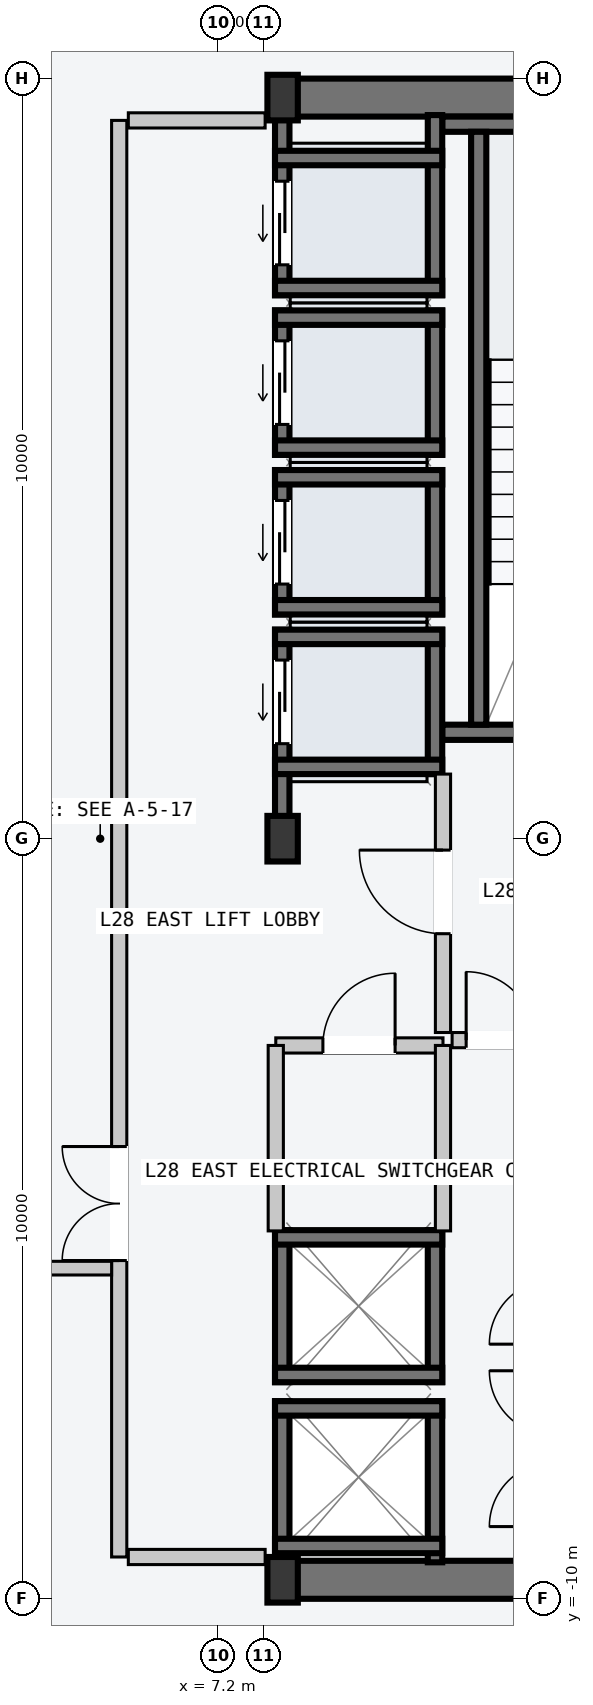
"""IFC4 building model, lengths in metres.
Left out: names, types, materials, properties, quantities, classifications, styles, units other than length and angle.
Written with IfcOpenShell. Run it as: python <this file> out.ifc"""

import sys

from ifc_helpers import new_model, si_unit, direction, frame, frame_2d, origin, origin_2d, place, context, subcontext, project, spatial, rectangle, i_section, extrude, element, fill, save


model = new_model("IFC4")
c1 = context("Model", 3, precision=1e-05, world=origin(), true_north=direction((0.0, 1.0)))
c2 = subcontext(c1, "Body", "Model", "MODEL_VIEW")
j1 = project(units=[si_unit("LENGTHUNIT", "METRE"), si_unit("PLANEANGLEUNIT", "RADIAN")], contexts=[c1])
p1 = place(None, origin())
s1 = spatial("IfcSite", under=j1, at=p1, CompositionType="ELEMENT")
p2 = place(p1, origin())
s2 = spatial("IfcBuilding", under=s1, at=p2, CompositionType="ELEMENT")
p3 = place(p2, frame((0.0, 0.0, 109.8)))
s3 = spatial("IfcBuildingStorey", under=s2, at=p3, CompositionType="ELEMENT", Elevation=109.8)
for number, where, z_axis, x_axis in (
    (1, (8.07, -9.75, -0.2), (0.0, 0.0, 1.0), (1.0, 0.0, 0.0)),
    (2, (8.07, 9.75, -0.2), (0.0, 0.0, 1.0), (1.0, 0.0, 0.0)),
):
    element("IfcWall", number, at=place(p3, frame(where, z_axis=z_axis, x_axis=x_axis)), inside=s3, PredefinedType="SHEAR", context=c2, shape_type="SweptSolid", body=[
        extrude(rectangle(XDim=6.46, YDim=0.5, at=frame_2d((3.23, 0.0))), origin(), (0.0, 0.0, 1.0), 3.6),
    ])
p4 = place(p3, frame((10.15, 1.4, -0.2), z_axis=(0.0, 0.0, 1.0), x_axis=(1.0, 0.0, 0.0)))
e3 = element("IfcWall", 3, at=p4, inside=s3, PredefinedType="SOLIDWALL", context=c2, shape_type="SweptSolid", body=[
    extrude(rectangle(XDim=4.1, YDim=0.2, at=frame_2d((2.05, 0.0))), origin(), (0.0, 0.0, 1.0), 3.6),
])
p5 = place(p4, frame((1.5, 0.0, 0.2)))
e4 = element("IfcOpeningElement", 4, at=p5, cuts=e3, PredefinedType="OPENING", context=c2, shape_type="SweptSolid", body=[
    extrude(rectangle(XDim=1.12, YDim=2.18, at=frame_2d((0.56, 1.09))), frame((0.0, 0.11, 0.0), z_axis=(0.0, -1.0, 0.0), x_axis=(1.0, 0.0, 0.0)), (0.0, 0.0, 1.0), 0.22),
])
p6 = place(p3, frame((10.15, 9.4, -0.2), z_axis=(0.0, 0.0, 1.0), x_axis=(1.0, 0.0, 0.0)))
e5 = element("IfcWall", 5, at=p6, inside=s3, PredefinedType="SOLIDWALL", context=c2, shape_type="SweptSolid", body=[
    extrude(rectangle(XDim=4.1, YDim=0.2, at=frame_2d((2.05, 0.0))), origin(), (0.0, 0.0, 1.0), 3.6),
])
p7 = place(p3, frame((10.63, 1.5, -0.2), z_axis=(0.0, 0.0, 1.0), x_axis=(0.0, 1.0, 0.0)))
e6 = element("IfcWall", 6, at=p7, inside=s3, PredefinedType="SOLIDWALL", context=c2, shape_type="SweptSolid", body=[
    extrude(rectangle(XDim=7.8, YDim=0.2, at=frame_2d((3.9, 0.0))), origin(), (0.0, 0.0, 1.0), 3.6),
])
for number, where, z_axis, x_axis in (
    (7, (8.05, -9.75, 0.0), (0.0, 0.0, 1.0), (1.0, 0.0, 0.0)),
    (8, (8.05, 0.0, 0.0), (0.0, 0.0, 1.0), (1.0, 0.0, 0.0)),
    (9, (8.05, 9.75, 0.0), (0.0, 0.0, 1.0), (1.0, 0.0, 0.0)),
):
    element("IfcColumn", number, at=place(p3, frame(where, z_axis=z_axis, x_axis=x_axis)), inside=s3, PredefinedType="COLUMN", context=c2, shape_type="SweptSolid", body=[
        extrude(i_section(OverallWidth=0.4, OverallDepth=0.6, WebThickness=0.022, FlangeThickness=0.036, at=origin_2d()), origin(), (0.0, 0.0, 1.0), 3.6),
    ])
p8 = place(p3, frame((8.045, 0.21, -0.2), z_axis=(0.0, 0.0, 1.0), x_axis=(0.0, 1.0, 0.0)))
e10 = element("IfcWall", 10, at=p8, inside=s3, PredefinedType="SOLIDWALL", context=c2, shape_type="SweptSolid", body=[
    extrude(rectangle(XDim=2.54, YDim=0.19, at=frame_2d((1.27, 0.0))), origin(), (0.0, 0.0, 1.0), 3.6),
])
p9 = place(p8, frame((1.04, 0.0, 0.2)))
e11 = element("IfcOpeningElement", 11, at=p9, cuts=e10, PredefinedType="OPENING", context=c2, shape_type="SweptSolid", body=[
    extrude(rectangle(XDim=1.1, YDim=2.2, at=frame_2d((0.55, 1.1))), frame((0.0, 0.105, 0.0), z_axis=(0.0, -1.0, 0.0), x_axis=(1.0, 0.0, 0.0)), (0.0, 0.0, 1.0), 0.21),
])
p10 = place(p3, frame((10.055, 0.85, -0.2), z_axis=(0.0, 0.0, 1.0), x_axis=(0.0, 1.0, 0.0)))
e12 = element("IfcWall", 12, at=p10, inside=s3, PredefinedType="SOLIDWALL", context=c2, shape_type="SweptSolid", body=[
    extrude(rectangle(XDim=1.9, YDim=0.19, at=frame_2d((0.95, 0.0))), origin(), (0.0, 0.0, 1.0), 3.6),
])
for number, where, z_axis, x_axis in (
    (13, (7.95, 2.655, -0.2), (0.0, 0.0, 1.0), (1.0, 0.0, 0.0)),
    (14, (7.95, 0.945, -0.2), (0.0, 0.0, 1.0), (1.0, 0.0, 0.0)),
):
    element("IfcWall", number, at=place(p3, frame(where, z_axis=z_axis, x_axis=x_axis)), inside=s3, PredefinedType="SOLIDWALL", context=c2, shape_type="SweptSolid", body=[
        extrude(rectangle(XDim=2.2, YDim=0.19, at=frame_2d((1.1, 0.0))), origin(), (0.0, 0.0, 1.0), 3.6),
    ])
p11 = place(p3, frame((8.045, 2.95, -0.2), z_axis=(0.0, 0.0, 1.0), x_axis=(0.0, 1.0, 0.0)))
e15 = element("IfcWall", 15, at=p11, inside=s3, PredefinedType="SOLIDWALL", context=c2, shape_type="SweptSolid", body=[
    extrude(rectangle(XDim=1.9, YDim=0.19, at=frame_2d((0.95, 0.0))), origin(), (0.0, 0.0, 1.0), 3.6),
])
p12 = place(p11, frame((0.4, 0.0, 0.2)))
e16 = element("IfcOpeningElement", 16, at=p12, cuts=e15, PredefinedType="OPENING", context=c2, shape_type="SweptSolid", body=[
    extrude(rectangle(XDim=1.1, YDim=2.2, at=frame_2d((0.55, 1.1))), frame((0.0, 0.105, 0.0), z_axis=(0.0, -1.0, 0.0), x_axis=(1.0, 0.0, 0.0)), (0.0, 0.0, 1.0), 0.21),
])
p13 = place(p3, frame((10.055, 2.95, -0.2), z_axis=(0.0, 0.0, 1.0), x_axis=(0.0, 1.0, 0.0)))
e17 = element("IfcWall", 17, at=p13, inside=s3, PredefinedType="SOLIDWALL", context=c2, shape_type="SweptSolid", body=[
    extrude(rectangle(XDim=1.9, YDim=0.19, at=frame_2d((0.95, 0.0))), origin(), (0.0, 0.0, 1.0), 3.6),
])
for number, where, z_axis, x_axis in (
    (18, (7.95, 4.755, -0.2), (0.0, 0.0, 1.0), (1.0, 0.0, 0.0)),
    (19, (7.95, 3.045, -0.2), (0.0, 0.0, 1.0), (1.0, 0.0, 0.0)),
):
    element("IfcWall", number, at=place(p3, frame(where, z_axis=z_axis, x_axis=x_axis)), inside=s3, PredefinedType="SOLIDWALL", context=c2, shape_type="SweptSolid", body=[
        extrude(rectangle(XDim=2.2, YDim=0.19, at=frame_2d((1.1, 0.0))), origin(), (0.0, 0.0, 1.0), 3.6),
    ])
p14 = place(p3, frame((8.045, 5.05, -0.2), z_axis=(0.0, 0.0, 1.0), x_axis=(0.0, 1.0, 0.0)))
e20 = element("IfcWall", 20, at=p14, inside=s3, PredefinedType="SOLIDWALL", context=c2, shape_type="SweptSolid", body=[
    extrude(rectangle(XDim=1.9, YDim=0.19, at=frame_2d((0.95, 0.0))), origin(), (0.0, 0.0, 1.0), 3.6),
])
p15 = place(p14, frame((0.4, 0.0, 0.2)))
e21 = element("IfcOpeningElement", 21, at=p15, cuts=e20, PredefinedType="OPENING", context=c2, shape_type="SweptSolid", body=[
    extrude(rectangle(XDim=1.1, YDim=2.2, at=frame_2d((0.55, 1.1))), frame((0.0, 0.105, 0.0), z_axis=(0.0, -1.0, 0.0), x_axis=(1.0, 0.0, 0.0)), (0.0, 0.0, 1.0), 0.21),
])
p16 = place(p3, frame((10.055, 5.05, -0.2), z_axis=(0.0, 0.0, 1.0), x_axis=(0.0, 1.0, 0.0)))
e22 = element("IfcWall", 22, at=p16, inside=s3, PredefinedType="SOLIDWALL", context=c2, shape_type="SweptSolid", body=[
    extrude(rectangle(XDim=1.9, YDim=0.19, at=frame_2d((0.95, 0.0))), origin(), (0.0, 0.0, 1.0), 3.6),
])
for number, where, z_axis, x_axis in (
    (23, (7.95, 6.855, -0.2), (0.0, 0.0, 1.0), (1.0, 0.0, 0.0)),
    (24, (7.95, 5.145, -0.2), (0.0, 0.0, 1.0), (1.0, 0.0, 0.0)),
):
    element("IfcWall", number, at=place(p3, frame(where, z_axis=z_axis, x_axis=x_axis)), inside=s3, PredefinedType="SOLIDWALL", context=c2, shape_type="SweptSolid", body=[
        extrude(rectangle(XDim=2.2, YDim=0.19, at=frame_2d((1.1, 0.0))), origin(), (0.0, 0.0, 1.0), 3.6),
    ])
p17 = place(p3, frame((8.045, 7.15, -0.2), z_axis=(0.0, 0.0, 1.0), x_axis=(0.0, 1.0, 0.0)))
e25 = element("IfcWall", 25, at=p17, inside=s3, PredefinedType="SOLIDWALL", context=c2, shape_type="SweptSolid", body=[
    extrude(rectangle(XDim=2.37, YDim=0.19, at=frame_2d((1.185, 0.0))), origin(), (0.0, 0.0, 1.0), 3.6),
])
p18 = place(p17, frame((0.4, 0.0, 0.2)))
e26 = element("IfcOpeningElement", 26, at=p18, cuts=e25, PredefinedType="OPENING", context=c2, shape_type="SweptSolid", body=[
    extrude(rectangle(XDim=1.1, YDim=2.2, at=frame_2d((0.55, 1.1))), frame((0.0, 0.105, 0.0), z_axis=(0.0, -1.0, 0.0), x_axis=(1.0, 0.0, 0.0)), (0.0, 0.0, 1.0), 0.21),
])
p19 = place(p3, frame((10.055, 7.15, -0.2), z_axis=(0.0, 0.0, 1.0), x_axis=(0.0, 1.0, 0.0)))
e27 = element("IfcWall", 27, at=p19, inside=s3, PredefinedType="SOLIDWALL", context=c2, shape_type="SweptSolid", body=[
    extrude(rectangle(XDim=2.37, YDim=0.19, at=frame_2d((1.185, 0.0))), origin(), (0.0, 0.0, 1.0), 3.6),
])
for number, where, z_axis, x_axis in (
    (28, (7.95, 8.955, -0.2), (0.0, 0.0, 1.0), (1.0, 0.0, 0.0)),
    (29, (7.95, 7.245, -0.2), (0.0, 0.0, 1.0), (1.0, 0.0, 0.0)),
):
    element("IfcWall", number, at=place(p3, frame(where, z_axis=z_axis, x_axis=x_axis)), inside=s3, PredefinedType="SOLIDWALL", context=c2, shape_type="SweptSolid", body=[
        extrude(rectangle(XDim=2.2, YDim=0.19, at=frame_2d((1.1, 0.0))), origin(), (0.0, 0.0, 1.0), 3.6),
    ])
for number, where, z_axis, x_axis in (
    (30, (8.045, -9.52, -0.2), (0.0, 0.0, 1.0), (0.0, 1.0, 0.0)),
    (31, (10.055, -9.52, -0.2), (0.0, 0.0, 1.0), (0.0, 1.0, 0.0)),
):
    element("IfcWall", number, at=place(p3, frame(where, z_axis=z_axis, x_axis=x_axis)), inside=s3, PredefinedType="SOLIDWALL", context=c2, shape_type="SweptSolid", body=[
        extrude(rectangle(XDim=2.12, YDim=0.19, at=frame_2d((1.06, 0.0))), origin(), (0.0, 0.0, 1.0), 3.6),
    ])
for number, where, z_axis, x_axis in (
    (32, (7.95, -7.495, -0.2), (0.0, 0.0, 1.0), (1.0, 0.0, 0.0)),
    (33, (7.95, -9.305, -0.2), (0.0, 0.0, 1.0), (1.0, 0.0, 0.0)),
):
    element("IfcWall", number, at=place(p3, frame(where, z_axis=z_axis, x_axis=x_axis)), inside=s3, PredefinedType="SOLIDWALL", context=c2, shape_type="SweptSolid", body=[
        extrude(rectangle(XDim=2.2, YDim=0.19, at=frame_2d((1.1, 0.0))), origin(), (0.0, 0.0, 1.0), 3.6),
    ])
for number, where, z_axis, x_axis in (
    (34, (8.045, -7.15, -0.2), (0.0, 0.0, 1.0), (0.0, 1.0, 0.0)),
    (35, (10.055, -7.15, -0.2), (0.0, 0.0, 1.0), (0.0, 1.0, 0.0)),
):
    element("IfcWall", number, at=place(p3, frame(where, z_axis=z_axis, x_axis=x_axis)), inside=s3, PredefinedType="SOLIDWALL", context=c2, shape_type="SweptSolid", body=[
        extrude(rectangle(XDim=2.0, YDim=0.19, at=frame_2d((1.0, 0.0))), origin(), (0.0, 0.0, 1.0), 3.6),
    ])
for number, where, z_axis, x_axis in (
    (36, (7.95, -5.245, -0.2), (0.0, 0.0, 1.0), (1.0, 0.0, 0.0)),
    (37, (7.95, -7.055, -0.2), (0.0, 0.0, 1.0), (1.0, 0.0, 0.0)),
):
    element("IfcWall", number, at=place(p3, frame(where, z_axis=z_axis, x_axis=x_axis)), inside=s3, PredefinedType="SOLIDWALL", context=c2, shape_type="SweptSolid", body=[
        extrude(rectangle(XDim=2.2, YDim=0.19, at=frame_2d((1.1, 0.0))), origin(), (0.0, 0.0, 1.0), 3.6),
    ])
p20 = place(p3, frame((5.9, -9.45, 0.0), z_axis=(0.0, 0.0, 1.0), x_axis=(0.0, 1.0, 0.0)))
e38 = element("IfcWall", 38, at=p20, inside=s3, PredefinedType="PARTITIONING", context=c2, shape_type="SweptSolid", body=[
    extrude(rectangle(XDim=18.9, YDim=0.2, at=frame_2d((9.45, 0.0))), origin(), (0.0, 0.0, 1.0), 3.4),
])
p21 = place(p20, frame((3.9, 0.0, 0.0)))
e39 = element("IfcOpeningElement", 39, at=p21, cuts=e38, PredefinedType="OPENING", context=c2, shape_type="SweptSolid", body=[
    extrude(rectangle(XDim=1.5, YDim=2.2, at=frame_2d((0.75, 1.1))), frame((0.0, 0.11, 0.0), z_axis=(0.0, -1.0, 0.0), x_axis=(1.0, 0.0, 0.0)), (0.0, 0.0, 1.0), 0.22),
])
for number, where, z_axis, x_axis in (
    (40, (6.02, -9.45, 0.0), (0.0, 0.0, 1.0), (1.0, 0.0, 0.0)),
    (41, (6.02, 9.45, 0.0), (0.0, 0.0, 1.0), (1.0, 0.0, 0.0)),
):
    element("IfcWall", number, at=place(p3, frame(where, z_axis=z_axis, x_axis=x_axis)), inside=s3, PredefinedType="PARTITIONING", context=c2, shape_type="SweptSolid", body=[
        extrude(rectangle(XDim=1.8, YDim=0.2, at=frame_2d((0.9, 0.0))), origin(), (0.0, 0.0, 1.0), 3.4),
    ])
p22 = place(p3, frame((10.16, -2.55, 0.0), z_axis=(0.0, 0.0, 1.0), x_axis=(0.0, 1.0, 0.0)))
e42 = element("IfcWall", 42, at=p22, inside=s3, PredefinedType="PARTITIONING", context=c2, shape_type="SweptSolid", body=[
    extrude(rectangle(XDim=3.4, YDim=0.2, at=frame_2d((1.7, 0.0))), origin(), (0.0, 0.0, 1.0), 3.4),
])
p23 = place(p22, frame((1.3, 0.0, 0.0)))
e43 = element("IfcOpeningElement", 43, at=p23, cuts=e42, PredefinedType="OPENING", context=c2, shape_type="SweptSolid", body=[
    extrude(rectangle(XDim=1.1, YDim=2.15, at=frame_2d((0.55, 1.075))), frame((0.0, 0.11, 0.0), z_axis=(0.0, -1.0, 0.0), x_axis=(1.0, 0.0, 0.0)), (0.0, 0.0, 1.0), 0.22),
])
p24 = place(p3, frame((10.28, -2.65, 0.0), z_axis=(0.0, 0.0, 1.0), x_axis=(1.0, 0.0, 0.0)))
e44 = element("IfcWall", 44, at=p24, inside=s3, PredefinedType="PARTITIONING", context=c2, shape_type="SweptSolid", body=[
    extrude(rectangle(XDim=1.27, YDim=0.2, at=frame_2d((0.635, 0.0))), origin(), (0.0, 0.0, 1.0), 3.4),
])
p25 = place(p24, frame((0.185, 0.0, 0.0)))
e45 = element("IfcOpeningElement", 45, at=p25, cuts=e44, PredefinedType="OPENING", context=c2, shape_type="SweptSolid", body=[
    extrude(rectangle(XDim=0.9, YDim=2.15, at=frame_2d((0.45, 1.075))), frame((0.0, 0.11, 0.0), z_axis=(0.0, -1.0, 0.0), x_axis=(1.0, 0.0, 0.0)), (0.0, 0.0, 1.0), 0.22),
])
p26 = place(p3, frame((7.96, -2.72, 0.0), z_axis=(0.0, 0.0, 1.0), x_axis=(1.0, 0.0, 0.0)))
e46 = element("IfcWall", 46, at=p26, inside=s3, PredefinedType="PARTITIONING", context=c2, shape_type="SweptSolid", body=[
    extrude(rectangle(XDim=2.2, YDim=0.2, at=frame_2d((1.1, 0.0))), origin(), (0.0, 0.0, 1.0), 3.4),
])
p27 = place(p26, frame((0.62, 0.0, 0.0)))
e47 = element("IfcOpeningElement", 47, at=p27, cuts=e46, PredefinedType="OPENING", context=c2, shape_type="SweptSolid", body=[
    extrude(rectangle(XDim=0.95, YDim=2.1, at=frame_2d((0.475, 1.05))), frame((0.0, 0.11, 0.0), z_axis=(0.0, -1.0, 0.0), x_axis=(1.0, 0.0, 0.0)), (0.0, 0.0, 1.0), 0.22),
])
for number, where, z_axis, x_axis in (
    (48, (7.96, -5.16, 0.0), (0.0, 0.0, 1.0), (0.0, 1.0, 0.0)),
    (49, (10.16, -5.16, 0.0), (0.0, 0.0, 1.0), (0.0, 1.0, 0.0)),
):
    element("IfcWall", number, at=place(p3, frame(where, z_axis=z_axis, x_axis=x_axis)), inside=s3, PredefinedType="PARTITIONING", context=c2, shape_type="SweptSolid", body=[
        extrude(rectangle(XDim=2.44, YDim=0.2, at=frame_2d((1.22, 0.0))), origin(), (0.0, 0.0, 1.0), 3.4),
    ])
p28 = place(p3, frame((-5.8, -5.65, 0.0), z_axis=(0.0, 0.0, 1.0), x_axis=(1.0, 0.0, 0.0)))
e50 = element("IfcWall", 50, at=p28, inside=s3, PredefinedType="PARTITIONING", context=c2, shape_type="SweptSolid", body=[
    extrude(rectangle(XDim=11.6, YDim=0.18, at=frame_2d((5.8, 0.0))), origin(), (0.0, 0.0, 1.0), 3.4),
])
p29 = place(p28, frame((5.1, 0.0, 0.0)))
e51 = element("IfcOpeningElement", 51, at=p29, cuts=e50, PredefinedType="OPENING", context=c2, shape_type="SweptSolid", body=[
    extrude(rectangle(XDim=1.4, YDim=2.2, at=frame_2d((0.7, 1.1))), frame((0.0, 0.1, 0.0), z_axis=(0.0, -1.0, 0.0), x_axis=(1.0, 0.0, 0.0)), (0.0, 0.0, 1.0), 0.2),
])
p30 = place(p9, origin())
e52 = element("IfcDoor", 52, at=p30, inside=s3, OperationType="SLIDING_TO_LEFT", PredefinedType="DOOR", context=c2, shape_type="SweptSolid", body=[
    extrude(rectangle(XDim=1.1, YDim=2.2, at=frame_2d((0.55, 1.1))), frame((0.0, 0.025, 0.0), z_axis=(0.0, -1.0, 0.0), x_axis=(1.0, 0.0, 0.0)), (0.0, 0.0, 1.0), 0.05),
])
fill(e11, e52)
p31 = place(p12, origin())
e53 = element("IfcDoor", 53, at=p31, inside=s3, OperationType="SLIDING_TO_LEFT", PredefinedType="DOOR", context=c2, shape_type="SweptSolid", body=[
    extrude(rectangle(XDim=1.1, YDim=2.2, at=frame_2d((0.55, 1.1))), frame((0.0, 0.025, 0.0), z_axis=(0.0, -1.0, 0.0), x_axis=(1.0, 0.0, 0.0)), (0.0, 0.0, 1.0), 0.05),
])
fill(e16, e53)
p32 = place(p15, origin())
e54 = element("IfcDoor", 54, at=p32, inside=s3, OperationType="SLIDING_TO_LEFT", PredefinedType="DOOR", context=c2, shape_type="SweptSolid", body=[
    extrude(rectangle(XDim=1.1, YDim=2.2, at=frame_2d((0.55, 1.1))), frame((0.0, 0.025, 0.0), z_axis=(0.0, -1.0, 0.0), x_axis=(1.0, 0.0, 0.0)), (0.0, 0.0, 1.0), 0.05),
])
fill(e21, e54)
p33 = place(p18, origin())
e55 = element("IfcDoor", 55, at=p33, inside=s3, OperationType="SLIDING_TO_LEFT", PredefinedType="DOOR", context=c2, shape_type="SweptSolid", body=[
    extrude(rectangle(XDim=1.1, YDim=2.2, at=frame_2d((0.55, 1.1))), frame((0.0, 0.025, 0.0), z_axis=(0.0, -1.0, 0.0), x_axis=(1.0, 0.0, 0.0)), (0.0, 0.0, 1.0), 0.05),
])
fill(e26, e55)
p34 = place(p21, origin())
e56 = element("IfcDoor", 56, at=p34, inside=s3, OperationType="DOUBLE_DOOR_SINGLE_SWING", PredefinedType="DOOR", context=c2, shape_type="SweptSolid", body=[
    extrude(rectangle(XDim=1.5, YDim=2.2, at=frame_2d((0.75, 1.1))), frame((0.0, 0.025, 0.0), z_axis=(0.0, -1.0, 0.0), x_axis=(1.0, 0.0, 0.0)), (0.0, 0.0, 1.0), 0.05),
])
fill(e39, e56)
p35 = place(p23, origin())
e57 = element("IfcDoor", 57, at=p35, inside=s3, OperationType="SINGLE_SWING_RIGHT", PredefinedType="DOOR", context=c2, shape_type="SweptSolid", body=[
    extrude(rectangle(XDim=1.1, YDim=2.15, at=frame_2d((0.55, 1.075))), frame((0.0, 0.025, 0.0), z_axis=(0.0, -1.0, 0.0), x_axis=(1.0, 0.0, 0.0)), (0.0, 0.0, 1.0), 0.05),
])
fill(e43, e57)
p36 = place(p25, origin())
e58 = element("IfcDoor", 58, at=p36, inside=s3, OperationType="SINGLE_SWING_LEFT", PredefinedType="DOOR", context=c2, shape_type="SweptSolid", body=[
    extrude(rectangle(XDim=0.9, YDim=2.15, at=frame_2d((0.45, 1.075))), frame((0.0, 0.025, 0.0), z_axis=(0.0, -1.0, 0.0), x_axis=(1.0, 0.0, 0.0)), (0.0, 0.0, 1.0), 0.05),
])
fill(e45, e58)
p37 = place(p27, origin())
e59 = element("IfcDoor", 59, at=p37, inside=s3, OperationType="SINGLE_SWING_RIGHT", PredefinedType="DOOR", context=c2, shape_type="SweptSolid", body=[
    extrude(rectangle(XDim=0.95, YDim=2.1, at=frame_2d((0.475, 1.05))), frame((0.0, 0.025, 0.0), z_axis=(0.0, -1.0, 0.0), x_axis=(1.0, 0.0, 0.0)), (0.0, 0.0, 1.0), 0.05),
])
fill(e47, e59)
save(model, sys.argv[1])
